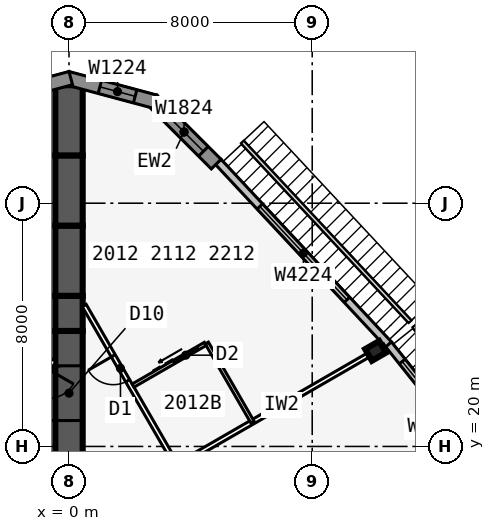
"""IFC4 building model, lengths in metres.
Left out: names, types, materials, properties, quantities, classifications, styles, units other than length and angle.
Written with IfcOpenShell. Run it as: python <this file> out.ifc"""

import sys

from ifc_helpers import new_model, si_unit, direction, frame, frame_2d, origin, origin_2d, place, context, subcontext, project, spatial, polyline, rectangle, i_section, outline, extrude, element, fill, save


model = new_model("IFC4")
c1 = context("Model", 3, precision=1e-05, world=origin(), true_north=direction((0.0, 1.0)))
c2 = subcontext(c1, "Body", "Model", "MODEL_VIEW")
j1 = project(units=[si_unit("LENGTHUNIT", "METRE"), si_unit("PLANEANGLEUNIT", "RADIAN")], contexts=[c1])
p1 = place(None, origin())
s1 = spatial("IfcSite", under=j1, at=p1, CompositionType="ELEMENT")
p2 = place(p1, origin())
s2 = spatial("IfcBuilding", under=s1, at=p2, CompositionType="ELEMENT")
p3 = place(p2, frame((0.0, 0.0, 79.5)))
s3 = spatial("IfcBuildingStorey", under=s2, at=p3, CompositionType="ELEMENT", Elevation=79.5)
p4 = place(p3, frame((0.0, 19.052, 0.0), z_axis=(0.0, 0.0, 1.0), x_axis=(0.0, 1.0, 0.0)))
e1 = element("IfcWall", 1, at=p4, inside=s3, PredefinedType="SHEAR", context=c2, shape_type="SweptSolid", body=[
    extrude(rectangle(XDim=4.746, YDim=0.9, at=frame_2d((2.373, 0.0))), origin(), (0.0, 0.0, 1.0), 3.4),
])
p5 = place(p4, frame((1.8, 0.0, 0.0)))
e2 = element("IfcOpeningElement", 2, at=p5, cuts=e1, PredefinedType="OPENING", context=c2, shape_type="SweptSolid", body=[
    extrude(rectangle(XDim=1.8, YDim=2.13, at=frame_2d((0.9, 1.065))), frame((0.0, 0.46, 0.0), z_axis=(0.0, -1.0, 0.0), x_axis=(1.0, 0.0, 0.0)), (0.0, 0.0, 1.0), 0.92),
])
p6 = place(p3, frame((0.0, 23.799, 0.0), z_axis=(0.0, 0.0, 1.0), x_axis=(0.0, 1.0, 0.0)))
e3 = element("IfcWall", 3, at=p6, inside=s3, PredefinedType="SHEAR", context=c2, shape_type="SweptSolid", body=[
    extrude(rectangle(XDim=1.155, YDim=0.9, at=frame_2d((0.577, 0.0))), origin(), (0.0, 0.0, 1.0), 3.4),
])
p7 = place(p3, frame((0.0, 24.953, 0.0), z_axis=(0.0, 0.0, 1.0), x_axis=(0.0, 1.0, 0.0)))
e4 = element("IfcWall", 4, at=p7, inside=s3, PredefinedType="SHEAR", context=c2, shape_type="SweptSolid", body=[
    extrude(rectangle(XDim=2.309, YDim=0.9, at=frame_2d((1.155, 0.0))), origin(), (0.0, 0.0, 1.0), 3.4),
])
p8 = place(p3, frame((0.0, 27.263, 0.0), z_axis=(0.0, 0.0, 1.0), x_axis=(0.0, 1.0, 0.0)))
e5 = element("IfcWall", 5, at=p8, inside=s3, PredefinedType="SHEAR", context=c2, shape_type="SweptSolid", body=[
    extrude(rectangle(XDim=2.31, YDim=0.9, at=frame_2d((1.155, 0.0))), origin(), (0.0, 0.0, 1.0), 3.4),
])
p9 = place(p3, frame((0.0, 29.572, 0.0), z_axis=(0.0, 0.0, 1.0), x_axis=(0.0, 1.0, 0.0)))
e6 = element("IfcWall", 6, at=p9, inside=s3, PredefinedType="SHEAR", context=c2, shape_type="SweptSolid", body=[
    extrude(rectangle(XDim=2.309, YDim=0.9, at=frame_2d((1.155, 0.0))), origin(), (0.0, 0.0, 1.0), 3.4),
])
p10 = place(p3, frame((10.083, 23.142, 0.0), z_axis=(0.0, 0.0, 1.0), x_axis=(-0.5, 0.866025403784, 0.0)))
e7 = element("IfcColumn", 7, at=p10, inside=s3, PredefinedType="COLUMN", context=c2, shape_type="SweptSolid", body=[
    extrude(i_section(OverallWidth=0.442, OverallDepth=0.531, WebThickness=0.066, FlangeThickness=0.106, at=origin_2d()), origin(), (0.0, 0.0, 1.0), 3.4),
])
p11 = place(p3, frame((13.664, 19.414, 0.0), z_axis=(0.0, 0.0, 1.0), x_axis=(-0.624594965756, 0.780948864364, 0.0)))
e8 = element("IfcWall", 8, at=p11, inside=s3, PredefinedType="STANDARD", context=c2, shape_type="SweptSolid", body=[
    extrude(rectangle(XDim=5.058, YDim=0.25, at=frame_2d((2.529, 0.0))), origin(), (0.0, 0.0, 1.0), 3.235),
])
p12 = place(p11, frame((0.729, 0.0, 0.45)))
e9 = element("IfcOpeningElement", 9, at=p12, cuts=e8, PredefinedType="OPENING", context=c2, shape_type="SweptSolid", body=[
    extrude(rectangle(XDim=3.6, YDim=2.4, at=frame_2d((1.8, 1.2))), frame((0.0, 0.135, 0.0), z_axis=(0.0, -1.0, 0.0), x_axis=(1.0, 0.0, 0.0)), (0.0, 0.0, 1.0), 0.27),
])
p13 = place(p3, frame((10.511, 23.357, 0.0), z_axis=(0.0, 0.0, 1.0), x_axis=(-0.682289646561, 0.731081964075, 0.0)))
e10 = element("IfcWall", 10, at=p13, inside=s3, PredefinedType="STANDARD", context=c2, shape_type="SweptSolid", body=[
    extrude(rectangle(XDim=8.211, YDim=0.25, at=frame_2d((4.105, 0.0))), origin(), (0.0, 0.0, 1.0), 3.235),
])
p14 = place(p13, frame((2.006, 0.0, 0.45)))
e11 = element("IfcOpeningElement", 11, at=p14, cuts=e10, PredefinedType="OPENING", context=c2, shape_type="SweptSolid", body=[
    extrude(rectangle(XDim=4.2, YDim=2.4, at=frame_2d((2.1, 1.2))), frame((0.0, 0.135, 0.0), z_axis=(0.0, -1.0, 0.0), x_axis=(1.0, 0.0, 0.0)), (0.0, 0.0, 1.0), 0.27),
])
p15 = place(p3, frame((4.841, 29.286, 0.0), z_axis=(0.0, 0.0, 1.0), x_axis=(-0.707106781187, 0.707106781187, 0.0)))
e12 = element("IfcWall", 12, at=p15, inside=s3, PredefinedType="SOLIDWALL", context=c2, shape_type="SweptSolid", body=[
    extrude(rectangle(XDim=2.988, YDim=0.45, at=frame_2d((1.494, 0.0))), origin(), (0.0, 0.0, 1.0), 3.235),
])
p16 = place(p15, frame((0.594, 0.0, 0.45)))
e13 = element("IfcOpeningElement", 13, at=p16, cuts=e12, PredefinedType="OPENING", context=c2, shape_type="SweptSolid", body=[
    extrude(rectangle(XDim=1.8, YDim=2.4, at=frame_2d((0.9, 1.2))), frame((0.0, 0.235, 0.0), z_axis=(0.0, -1.0, 0.0), x_axis=(1.0, 0.0, 0.0)), (0.0, 0.0, 1.0), 0.47),
])
p17 = place(p3, frame((2.829, 31.341, 0.0), z_axis=(0.0, 0.0, 1.0), x_axis=(-0.965930548995, 0.258801419081, 0.0)))
e14 = element("IfcWall", 14, at=p17, inside=s3, PredefinedType="SOLIDWALL", context=c2, shape_type="SweptSolid", body=[
    extrude(outline(polyline([(2.989, 0.225), (2.929, 0.225), (2.438, 0.093), (2.402, 0.225), (0.0, 0.225), (0.0, -0.225), (2.989, -0.225), (2.989, 0.225)])), origin(), (0.0, 0.0, 1.0), 3.235),
])
p18 = place(p17, frame((0.676, 0.0, 0.45)))
e15 = element("IfcOpeningElement", 15, at=p18, cuts=e14, PredefinedType="OPENING", context=c2, shape_type="SweptSolid", body=[
    extrude(rectangle(XDim=1.2, YDim=2.4, at=frame_2d((0.6, 1.2))), frame((0.0, 0.235, 0.0), z_axis=(0.0, -1.0, 0.0), x_axis=(1.0, 0.0, 0.0)), (0.0, 0.0, 1.0), 0.47),
])
p19 = place(p3, frame((0.058, 32.114, 0.0), z_axis=(0.0, 0.0, 1.0), x_axis=(-0.965930548995, -0.258801419081, 0.0)))
e16 = element("IfcWall", 16, at=p19, inside=s3, PredefinedType="SOLIDWALL", context=c2, shape_type="SweptSolid", body=[
    extrude(outline(polyline([(2.989, 0.225), (0.586, 0.225), (0.551, 0.093), (0.059, 0.225), (0.0, 0.225), (0.0, -0.225), (2.989, -0.225), (2.989, 0.225)])), origin(), (0.0, 0.0, 1.0), 3.235),
])
p20 = place(p19, frame((1.113, 0.0, 0.45)))
e17 = element("IfcOpeningElement", 17, at=p20, cuts=e16, PredefinedType="OPENING", context=c2, shape_type="SweptSolid", body=[
    extrude(rectangle(XDim=1.2, YDim=2.4, at=frame_2d((0.6, 1.2))), frame((0.0, 0.235, 0.0), z_axis=(0.0, -1.0, 0.0), x_axis=(1.0, 0.0, 0.0)), (0.0, 0.0, 1.0), 0.47),
])
p21 = place(p3, frame((21.586, -11.885, 0.0), z_axis=(0.0, 0.0, 1.0), x_axis=(-0.500001915564, 0.86602429783, 0.0)))
e18 = element("IfcWall", 18, at=p21, inside=s3, PredefinedType="PARTITIONING", context=c2, shape_type="SweptSolid", body=[
    extrude(rectangle(XDim=42.172, YDim=0.15, at=frame_2d((21.086, 0.0))), origin(), (0.0, 0.0, 1.0), 3.235),
])
p22 = place(p21, frame((1.911, 0.0, 0.0)))
e19 = element("IfcOpeningElement", 19, at=p22, cuts=e18, PredefinedType="OPENING", context=c2, shape_type="SweptSolid", body=[
    extrude(rectangle(XDim=0.95, YDim=2.13, at=frame_2d((0.475, 1.065))), frame((0.0, 0.085, 0.0), z_axis=(0.0, -1.0, 0.0), x_axis=(1.0, 0.0, 0.0)), (0.0, 0.0, 1.0), 0.17),
])
p23 = place(p21, frame((8.711, 0.0, 0.0)))
e20 = element("IfcOpeningElement", 20, at=p23, cuts=e18, PredefinedType="OPENING", context=c2, shape_type="SweptSolid", body=[
    extrude(rectangle(XDim=0.95, YDim=2.13, at=frame_2d((0.475, 1.065))), frame((0.0, 0.085, 0.0), z_axis=(0.0, -1.0, 0.0), x_axis=(1.0, 0.0, 0.0)), (0.0, 0.0, 1.0), 0.17),
])
p24 = place(p21, frame((13.111, 0.0, 0.0)))
e21 = element("IfcOpeningElement", 21, at=p24, cuts=e18, PredefinedType="OPENING", context=c2, shape_type="SweptSolid", body=[
    extrude(rectangle(XDim=0.95, YDim=2.13, at=frame_2d((0.475, 1.065))), frame((0.0, 0.085, 0.0), z_axis=(0.0, -1.0, 0.0), x_axis=(1.0, 0.0, 0.0)), (0.0, 0.0, 1.0), 0.17),
])
p25 = place(p21, frame((23.711, 0.0, 0.0)))
e22 = element("IfcOpeningElement", 22, at=p25, cuts=e18, PredefinedType="OPENING", context=c2, shape_type="SweptSolid", body=[
    extrude(rectangle(XDim=0.95, YDim=2.13, at=frame_2d((0.475, 1.065))), frame((0.0, 0.085, 0.0), z_axis=(0.0, -1.0, 0.0), x_axis=(1.0, 0.0, 0.0)), (0.0, 0.0, 1.0), 0.17),
])
p26 = place(p21, frame((29.311, 0.0, 0.0)))
e23 = element("IfcOpeningElement", 23, at=p26, cuts=e18, PredefinedType="OPENING", context=c2, shape_type="SweptSolid", body=[
    extrude(rectangle(XDim=0.95, YDim=2.13, at=frame_2d((0.475, 1.065))), frame((0.0, 0.085, 0.0), z_axis=(0.0, -1.0, 0.0), x_axis=(1.0, 0.0, 0.0)), (0.0, 0.0, 1.0), 0.17),
])
p27 = place(p21, frame((39.311, 0.0, 0.0)))
e24 = element("IfcOpeningElement", 24, at=p27, cuts=e18, PredefinedType="OPENING", context=c2, shape_type="SweptSolid", body=[
    extrude(rectangle(XDim=0.95, YDim=2.13, at=frame_2d((0.475, 1.065))), frame((0.0, 0.085, 0.0), z_axis=(0.0, -1.0, 0.0), x_axis=(1.0, 0.0, 0.0)), (0.0, 0.0, 1.0), 0.17),
])
p28 = place(p3, frame((3.608, 19.404, 0.0), z_axis=(0.0, 0.0, 1.0), x_axis=(0.866021300503, 0.500007107024, 0.0)))
e25 = element("IfcWall", 25, at=p28, inside=s3, PredefinedType="PARTITIONING", context=c2, shape_type="SweptSolid", body=[
    extrude(rectangle(XDim=7.82, YDim=0.15, at=frame_2d((3.91, 0.0))), origin(), (0.0, 0.0, 1.0), 2.389),
])
p29 = place(p3, frame((6.033, 20.803, 0.0), z_axis=(0.0, 0.0, 1.0), x_axis=(-0.499990139034, 0.866031096941, 0.0)))
e26 = element("IfcWall", 26, at=p29, inside=s3, PredefinedType="PLUMBINGWALL", context=c2, shape_type="SweptSolid", body=[
    extrude(rectangle(XDim=3.0, YDim=0.12, at=frame_2d((1.5, 0.0))), origin(), (0.0, 0.0, 1.0), 3.235),
])
p30 = place(p3, frame((2.108, 22.002, 0.0), z_axis=(0.0, 0.0, 1.0), x_axis=(0.866035715982, 0.499982138324, 0.0)))
e27 = element("IfcWall", 27, at=p30, inside=s3, PredefinedType="PLUMBINGWALL", context=c2, shape_type="SweptSolid", body=[
    extrude(rectangle(XDim=2.74, YDim=0.12, at=frame_2d((1.37, 0.0))), origin(), (0.0, 0.0, 1.0), 3.235),
])
p31 = place(p30, frame((1.55, 0.0, 0.0)))
e28 = element("IfcOpeningElement", 28, at=p31, cuts=e27, PredefinedType="OPENING", context=c2, shape_type="SweptSolid", body=[
    extrude(rectangle(XDim=0.9, YDim=2.13, at=frame_2d((0.45, 1.065))), frame((0.0, 0.07, 0.0), z_axis=(0.0, -1.0, 0.0), x_axis=(1.0, 0.0, 0.0)), (0.0, 0.0, 1.0), 0.14),
])
p32 = place(p3, frame((-0.5, 22.836, 0.0), z_axis=(0.0, 0.0, 1.0), x_axis=(-0.500001677587, -0.866024435227, 0.0)))
e29 = element("IfcWall", 29, at=p32, inside=s3, PredefinedType="PARTITIONING", context=c2, shape_type="SweptSolid", body=[
    extrude(rectangle(XDim=39.054, YDim=0.15, at=frame_2d((19.527, 0.0))), origin(), (0.0, 0.0, 1.0), 3.235),
])
p33 = place(p32, frame((0.352, 0.0, 0.0)))
e30 = element("IfcOpeningElement", 30, at=p33, cuts=e29, PredefinedType="OPENING", context=c2, shape_type="SweptSolid", body=[
    extrude(rectangle(XDim=0.95, YDim=2.13, at=frame_2d((0.475, 1.065))), frame((0.0, 0.085, 0.0), z_axis=(0.0, -1.0, 0.0), x_axis=(1.0, 0.0, 0.0)), (0.0, 0.0, 1.0), 0.17),
])
p34 = place(p32, frame((11.552, 0.0, 0.0)))
e31 = element("IfcOpeningElement", 31, at=p34, cuts=e29, PredefinedType="OPENING", context=c2, shape_type="SweptSolid", body=[
    extrude(rectangle(XDim=0.95, YDim=2.13, at=frame_2d((0.475, 1.065))), frame((0.0, 0.085, 0.0), z_axis=(0.0, -1.0, 0.0), x_axis=(1.0, 0.0, 0.0)), (0.0, 0.0, 1.0), 0.17),
])
p35 = place(p32, frame((21.552, 0.0, 0.0)))
e32 = element("IfcOpeningElement", 32, at=p35, cuts=e29, PredefinedType="OPENING", context=c2, shape_type="SweptSolid", body=[
    extrude(rectangle(XDim=0.95, YDim=2.13, at=frame_2d((0.475, 1.065))), frame((0.0, 0.085, 0.0), z_axis=(0.0, -1.0, 0.0), x_axis=(1.0, 0.0, 0.0)), (0.0, 0.0, 1.0), 0.17),
])
p36 = place(p32, frame((36.546, 0.0, 0.0)))
e33 = element("IfcOpeningElement", 33, at=p36, cuts=e29, PredefinedType="OPENING", context=c2, shape_type="SweptSolid", body=[
    extrude(rectangle(XDim=0.95, YDim=2.13, at=frame_2d((0.475, 1.065))), frame((0.0, 0.085, 0.0), z_axis=(0.0, -1.0, 0.0), x_axis=(1.0, 0.0, 0.0)), (0.0, 0.0, 1.0), 0.17),
])
p37 = place(p12, origin())
e34 = element("IfcWindow", 34, at=p37, inside=s3, PartitioningType="SINGLE_PANEL", PredefinedType="WINDOW", context=c2, shape_type="SweptSolid", body=[
    extrude(rectangle(XDim=3.6, YDim=2.4, at=frame_2d((1.8, 1.2))), frame((0.0, 0.03, 0.0), z_axis=(0.0, -1.0, 0.0), x_axis=(1.0, 0.0, 0.0)), (0.0, 0.0, 1.0), 0.06),
])
fill(e9, e34)
p38 = place(p14, origin())
e35 = element("IfcWindow", 35, at=p38, inside=s3, PartitioningType="SINGLE_PANEL", PredefinedType="WINDOW", context=c2, shape_type="SweptSolid", body=[
    extrude(rectangle(XDim=4.2, YDim=2.4, at=frame_2d((2.1, 1.2))), frame((0.0, 0.03, 0.0), z_axis=(0.0, -1.0, 0.0), x_axis=(1.0, 0.0, 0.0)), (0.0, 0.0, 1.0), 0.06),
])
fill(e11, e35)
p39 = place(p16, origin())
e36 = element("IfcWindow", 36, at=p39, inside=s3, PartitioningType="SINGLE_PANEL", PredefinedType="WINDOW", context=c2, shape_type="SweptSolid", body=[
    extrude(rectangle(XDim=1.8, YDim=2.4, at=frame_2d((0.9, 1.2))), frame((0.0, 0.03, 0.0), z_axis=(0.0, -1.0, 0.0), x_axis=(1.0, 0.0, 0.0)), (0.0, 0.0, 1.0), 0.06),
])
fill(e13, e36)
p40 = place(p18, origin())
e37 = element("IfcWindow", 37, at=p40, inside=s3, PartitioningType="SINGLE_PANEL", PredefinedType="WINDOW", context=c2, shape_type="SweptSolid", body=[
    extrude(rectangle(XDim=1.2, YDim=2.4, at=frame_2d((0.6, 1.2))), frame((0.0, 0.03, 0.0), z_axis=(0.0, -1.0, 0.0), x_axis=(1.0, 0.0, 0.0)), (0.0, 0.0, 1.0), 0.06),
])
fill(e15, e37)
p41 = place(p31, origin())
e38 = element("IfcDoor", 38, at=p41, inside=s3, OperationType="SLIDING_TO_LEFT", PredefinedType="DOOR", context=c2, shape_type="SweptSolid", body=[
    extrude(rectangle(XDim=0.9, YDim=2.13, at=frame_2d((0.45, 1.065))), frame((0.0, 0.025, 0.0), z_axis=(0.0, -1.0, 0.0), x_axis=(1.0, 0.0, 0.0)), (0.0, 0.0, 1.0), 0.05),
])
fill(e28, e38)
p42 = place(p27, origin())
e39 = element("IfcDoor", 39, at=p42, inside=s3, OperationType="SINGLE_SWING_RIGHT", PredefinedType="DOOR", context=c2, shape_type="SweptSolid", body=[
    extrude(rectangle(XDim=0.95, YDim=2.13, at=frame_2d((0.475, 1.065))), frame((0.0, 0.025, 0.0), z_axis=(0.0, -1.0, 0.0), x_axis=(1.0, 0.0, 0.0)), (0.0, 0.0, 1.0), 0.05),
])
fill(e24, e39)
p43 = place(p5, origin())
e40 = element("IfcDoor", 40, at=p43, inside=s3, OperationType="DOUBLE_DOOR_DOUBLE_SWING", PredefinedType="DOOR", context=c2, shape_type="SweptSolid", body=[
    extrude(rectangle(XDim=1.8, YDim=2.13, at=frame_2d((0.9, 1.065))), frame((0.0, 0.025, 0.0), z_axis=(0.0, -1.0, 0.0), x_axis=(1.0, 0.0, 0.0)), (0.0, 0.0, 1.0), 0.05),
])
fill(e2, e40)
save(model, sys.argv[1])
